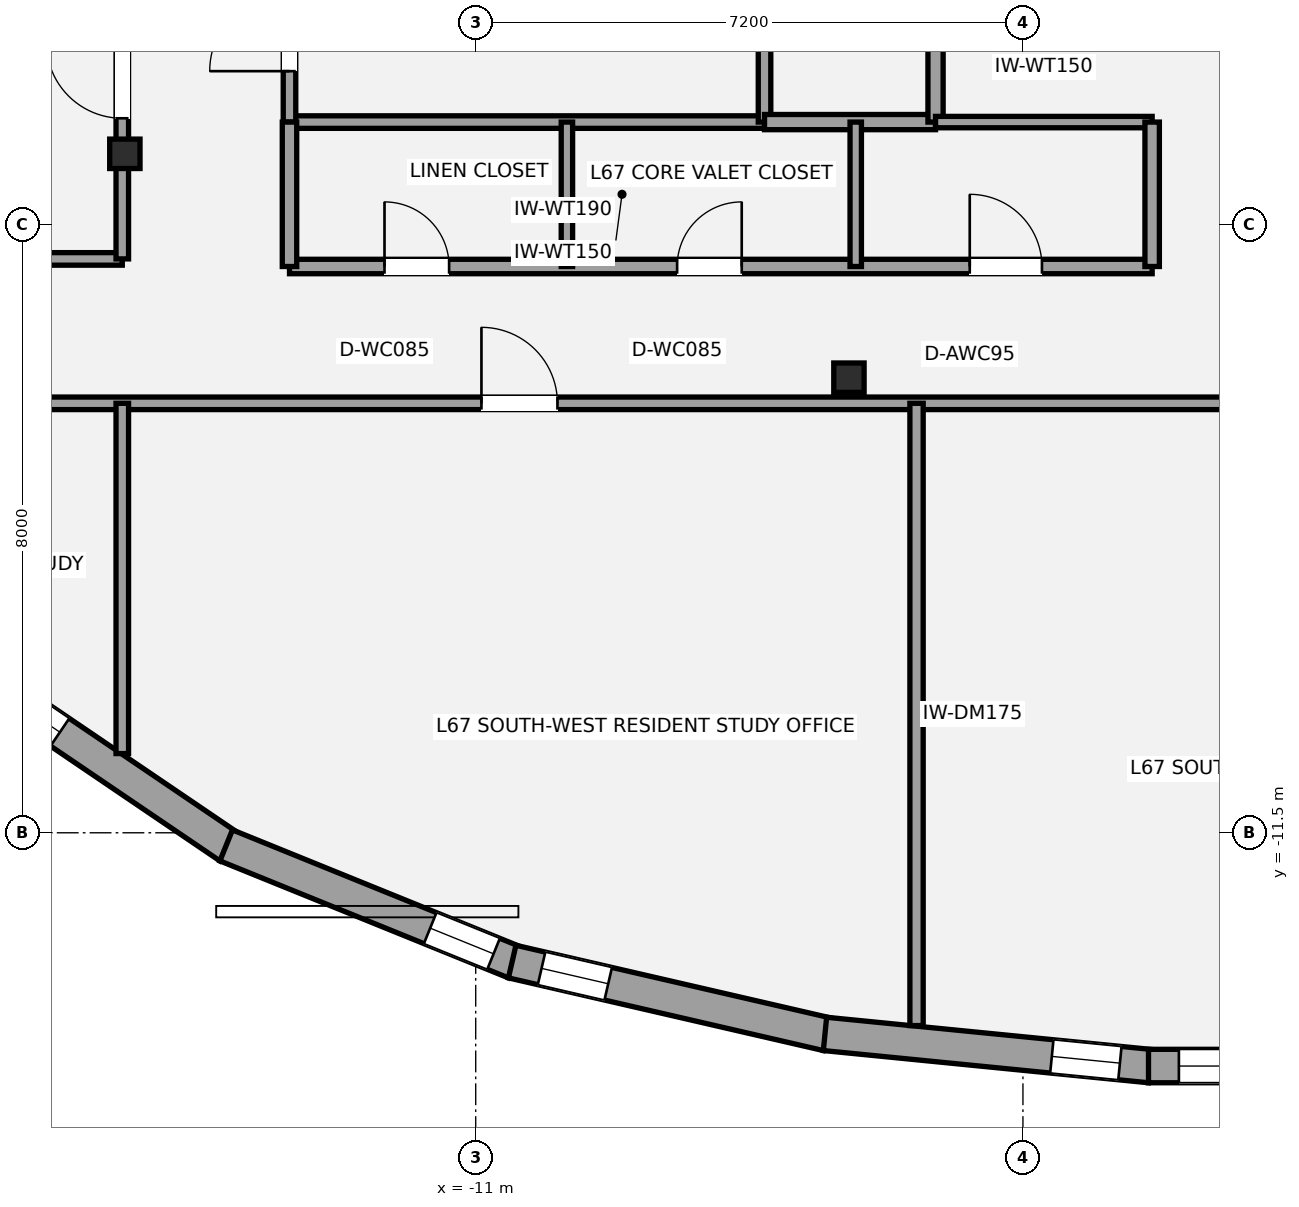
"""IFC4 building model, lengths in metres.
Left out: names, types, materials, properties, quantities, classifications, styles, units other than length and angle.
Written with IfcOpenShell. Run it as: python <this file> out.ifc"""

import sys

from ifc_helpers import new_model, si_unit, direction, frame, frame_2d, origin, origin_2d, place, context, subcontext, project, spatial, rectangle, i_section, extrude, element, fill, save


model = new_model("IFC4")
c1 = context("Model", 3, precision=1e-05, world=origin(), true_north=direction((0.0, 1.0)))
c2 = subcontext(c1, "Body", "Model", "MODEL_VIEW")
j1 = project(units=[si_unit("LENGTHUNIT", "METRE"), si_unit("PLANEANGLEUNIT", "RADIAN")], contexts=[c1])
p1 = place(None, origin())
s1 = spatial("IfcSite", under=j1, at=p1, CompositionType="ELEMENT")
p2 = place(p1, origin())
s2 = spatial("IfcBuilding", under=s1, at=p2, CompositionType="ELEMENT")
p3 = place(p2, frame((0.0, 0.0, 238.35)))
s3 = spatial("IfcBuildingStorey", under=s2, at=p3, CompositionType="ELEMENT", Elevation=238.35)
for number, where, z_axis, x_axis in (
    (1, (-15.616, -2.567, 0.0), (0.0, 0.0, 1.0), (1.0, 0.0, 0.0)),
    (2, (-6.09, -5.513, 0.0), (0.0, 0.0, 1.0), (1.0, 0.0, 0.0)),
):
    element("IfcColumn", number, at=place(p3, frame(where, z_axis=z_axis, x_axis=x_axis)), inside=s3, PredefinedType="COLUMN", context=c2, shape_type="SweptSolid", body=[
        extrude(i_section(OverallWidth=0.399, OverallDepth=0.387, WebThickness=0.021, FlangeThickness=0.033, at=origin_2d()), origin(), (0.0, 0.0, 1.0), 3.15),
    ])
p4 = place(p3, frame((-14.242, -11.688, 0.0), z_axis=(0.0, 0.0, 1.0), x_axis=(-0.827637036896, 0.561263694851, 0.0)))
e3 = element("IfcWall", 3, at=p4, inside=s3, PredefinedType="STANDARD", context=c2, shape_type="SweptSolid", body=[
    extrude(rectangle(XDim=3.793, YDim=0.44, at=frame_2d((1.896, 0.0))), origin(), (0.0, 0.0, 1.0), 2.336),
])
p5 = place(p4, frame((2.693, 0.0, 0.58)))
e4 = element("IfcOpeningElement", 4, at=p5, cuts=e3, PredefinedType="OPENING", context=c2, shape_type="SweptSolid", body=[
    extrude(rectangle(XDim=0.9, YDim=1.35, at=frame_2d((0.45, 0.675))), frame((0.0, 0.23, 0.0), z_axis=(0.0, -1.0, 0.0), x_axis=(1.0, 0.0, 0.0)), (0.0, 0.0, 1.0), 0.46),
])
p6 = place(p3, frame((-10.487, -13.205, 0.0), z_axis=(0.0, 0.0, 1.0), x_axis=(-0.926731976866, 0.375723093586, 0.0)))
e5 = element("IfcWall", 5, at=p6, inside=s3, PredefinedType="STANDARD", context=c2, shape_type="SweptSolid", body=[
    extrude(rectangle(XDim=4.096, YDim=0.44, at=frame_2d((2.048, 0.0))), origin(), (0.0, 0.0, 1.0), 2.336),
])
p7 = place(p6, frame((0.3, 0.0, 0.58)))
e6 = element("IfcOpeningElement", 6, at=p7, cuts=e5, PredefinedType="OPENING", context=c2, shape_type="SweptSolid", body=[
    extrude(rectangle(XDim=0.9, YDim=1.35, at=frame_2d((0.45, 0.675))), frame((0.0, 0.23, 0.0), z_axis=(0.0, -1.0, 0.0), x_axis=(1.0, 0.0, 0.0)), (0.0, 0.0, 1.0), 0.46),
])
p8 = place(p3, frame((-6.377, -14.151, 0.0), z_axis=(0.0, 0.0, 1.0), x_axis=(-0.974398936081, 0.224825962391, 0.0)))
e7 = element("IfcWall", 7, at=p8, inside=s3, PredefinedType="STANDARD", context=c2, shape_type="SweptSolid", body=[
    extrude(rectangle(XDim=4.252, YDim=0.44, at=frame_2d((2.126, 0.0))), origin(), (0.0, 0.0, 1.0), 2.336),
])
p9 = place(p8, frame((2.956, 0.0, 0.58)))
e8 = element("IfcOpeningElement", 8, at=p9, cuts=e7, PredefinedType="OPENING", context=c2, shape_type="SweptSolid", body=[
    extrude(rectangle(XDim=0.9, YDim=1.35, at=frame_2d((0.45, 0.675))), frame((0.0, 0.23, 0.0), z_axis=(0.0, -1.0, 0.0), x_axis=(1.0, 0.0, 0.0)), (0.0, 0.0, 1.0), 0.46),
])
p10 = place(p3, frame((-2.126, -14.57, 0.0), z_axis=(0.0, 0.0, 1.0), x_axis=(-0.995134540264, 0.098525361068, 0.0)))
e9 = element("IfcWall", 9, at=p10, inside=s3, PredefinedType="STANDARD", context=c2, shape_type="SweptSolid", body=[
    extrude(rectangle(XDim=4.299, YDim=0.44, at=frame_2d((2.15, 0.0))), origin(), (0.0, 0.0, 1.0), 2.336),
])
p11 = place(p10, frame((0.4, 0.0, 0.58)))
e10 = element("IfcOpeningElement", 10, at=p11, cuts=e9, PredefinedType="OPENING", context=c2, shape_type="SweptSolid", body=[
    extrude(rectangle(XDim=0.9, YDim=1.35, at=frame_2d((0.45, 0.675))), frame((0.0, 0.23, 0.0), z_axis=(0.0, -1.0, 0.0), x_axis=(1.0, 0.0, 0.0)), (0.0, 0.0, 1.0), 0.46),
])
p12 = place(p3, frame((2.148, -14.569, 0.0), z_axis=(0.0, 0.0, 1.0), x_axis=(-1.0, 0.0, 0.0)))
e11 = element("IfcWall", 11, at=p12, inside=s3, PredefinedType="STANDARD", context=c2, shape_type="SweptSolid", body=[
    extrude(rectangle(XDim=4.296, YDim=0.44, at=frame_2d((2.148, 0.0))), origin(), (0.0, 0.0, 1.0), 2.336),
])
p13 = place(p12, frame((2.996, 0.0, 0.58)))
e12 = element("IfcOpeningElement", 12, at=p13, cuts=e11, PredefinedType="OPENING", context=c2, shape_type="SweptSolid", body=[
    extrude(rectangle(XDim=0.9, YDim=1.35, at=frame_2d((0.45, 0.675))), frame((0.0, 0.23, 0.0), z_axis=(0.0, -1.0, 0.0), x_axis=(1.0, 0.0, 0.0)), (0.0, 0.0, 1.0), 0.46),
])
p14 = place(p3, frame((-13.45, -2.15, 0.0), z_axis=(0.0, 0.0, 1.0), x_axis=(1.0, 0.0, 0.0)))
e13 = element("IfcWall", 13, at=p14, inside=s3, PredefinedType="PARTITIONING", context=c2, shape_type="SweptSolid", body=[
    extrude(rectangle(XDim=6.25, YDim=0.165, at=frame_2d((3.125, 0.0))), origin(), (0.0, 0.0, 1.0), 2.423),
])
p15 = place(p3, frame((-13.45, -2.15, 0.0), z_axis=(0.0, 0.0, 1.0), x_axis=(0.0, 1.0, 0.0)))
e14 = element("IfcWall", 14, at=p15, inside=s3, PredefinedType="PARTITIONING", context=c2, shape_type="SweptSolid", body=[
    extrude(rectangle(XDim=3.5, YDim=0.165, at=frame_2d((1.75, 0.0))), origin(), (0.0, 0.0, 1.0), 2.423),
])
p16 = place(p15, frame((0.67, 0.0, 0.0)))
e15 = element("IfcOpeningElement", 15, at=p16, cuts=e14, PredefinedType="OPENING", context=c2, shape_type="SweptSolid", body=[
    extrude(rectangle(XDim=1.05, YDim=2.15, at=frame_2d((0.525, 1.075))), frame((0.0, 0.093, 0.0), z_axis=(0.0, -1.0, 0.0), x_axis=(1.0, 0.0, 0.0)), (0.0, 0.0, 1.0), 0.185),
])
p17 = place(p3, frame((-7.2, -2.15, 0.0), z_axis=(0.0, 0.0, 1.0), x_axis=(0.0, 1.0, 0.0)))
e16 = element("IfcWall", 16, at=p17, inside=s3, PredefinedType="PARTITIONING", context=c2, shape_type="SweptSolid", body=[
    extrude(rectangle(XDim=3.5, YDim=0.165, at=frame_2d((1.75, 0.0))), origin(), (0.0, 0.0, 1.0), 2.423),
])
p18 = place(p3, frame((-7.2, -2.15, 0.0), z_axis=(0.0, 0.0, 1.0), x_axis=(1.0, 0.0, 0.0)))
e17 = element("IfcWall", 17, at=p18, inside=s3, PredefinedType="SOLIDWALL", context=c2, shape_type="SweptSolid", body=[
    extrude(rectangle(XDim=2.25, YDim=0.2, at=frame_2d((1.125, 0.0))), origin(), (0.0, 0.0, 1.0), 2.97),
])
p19 = place(p3, frame((-4.95, -2.15, 0.0), z_axis=(0.0, 0.0, 1.0), x_axis=(0.0, 1.0, 0.0)))
e18 = element("IfcWall", 18, at=p19, inside=s3, PredefinedType="SOLIDWALL", context=c2, shape_type="SweptSolid", body=[
    extrude(rectangle(XDim=3.5, YDim=0.2, at=frame_2d((1.75, 0.0))), origin(), (0.0, 0.0, 1.0), 2.423),
])
p20 = place(p19, frame((0.95, 0.0, 0.0)))
e19 = element("IfcOpeningElement", 19, at=p20, cuts=e18, PredefinedType="OPENING", context=c2, shape_type="SweptSolid", body=[
    extrude(rectangle(XDim=0.75, YDim=2.1, at=frame_2d((0.375, 1.05))), frame((0.0, 0.11, 0.0), z_axis=(0.0, -1.0, 0.0), x_axis=(1.0, 0.0, 0.0)), (0.0, 0.0, 1.0), 0.22),
])
p21 = place(p3, frame((-13.45, -4.05, 0.0), z_axis=(0.0, 0.0, 1.0), x_axis=(1.0, 0.0, 0.0)))
e20 = element("IfcWall", 20, at=p21, inside=s3, PredefinedType="PLUMBINGWALL", context=c2, shape_type="SweptSolid", body=[
    extrude(rectangle(XDim=11.35, YDim=0.19, at=frame_2d((5.675, 0.0))), origin(), (0.0, 0.0, 1.0), 2.357),
])
p22 = place(p21, frame((1.25, 0.0, 0.0)))
e21 = element("IfcOpeningElement", 21, at=p22, cuts=e20, PredefinedType="OPENING", context=c2, shape_type="SweptSolid", body=[
    extrude(rectangle(XDim=0.85, YDim=2.1, at=frame_2d((0.425, 1.05))), frame((0.0, 0.105, 0.0), z_axis=(0.0, -1.0, 0.0), x_axis=(1.0, 0.0, 0.0)), (0.0, 0.0, 1.0), 0.21),
])
p23 = place(p21, frame((5.1, 0.0, 0.0)))
e22 = element("IfcOpeningElement", 22, at=p23, cuts=e20, PredefinedType="OPENING", context=c2, shape_type="SweptSolid", body=[
    extrude(rectangle(XDim=0.85, YDim=2.1, at=frame_2d((0.425, 1.05))), frame((0.0, 0.105, 0.0), z_axis=(0.0, -1.0, 0.0), x_axis=(1.0, 0.0, 0.0)), (0.0, 0.0, 1.0), 0.21),
])
p24 = place(p21, frame((8.95, 0.0, 0.0)))
e23 = element("IfcOpeningElement", 23, at=p24, cuts=e20, PredefinedType="OPENING", context=c2, shape_type="SweptSolid", body=[
    extrude(rectangle(XDim=0.95, YDim=2.15, at=frame_2d((0.475, 1.075))), frame((0.0, 0.105, 0.0), z_axis=(0.0, -1.0, 0.0), x_axis=(1.0, 0.0, 0.0)), (0.0, 0.0, 1.0), 0.21),
])
p25 = place(p3, frame((-4.95, -2.15, 0.0), z_axis=(0.0, 0.0, 1.0), x_axis=(1.0, 0.0, 0.0)))
e24 = element("IfcWall", 24, at=p25, inside=s3, PredefinedType="PLUMBINGWALL", context=c2, shape_type="SweptSolid", body=[
    extrude(rectangle(XDim=2.85, YDim=0.15, at=frame_2d((1.425, 0.0))), origin(), (0.0, 0.0, 1.0), 2.97),
])
for number, where, z_axis, x_axis in (
    (25, (-13.45, -4.05, 0.0), (0.0, 0.0, 1.0), (0.0, 1.0, 0.0)),
    (26, (-2.1, -4.05, 0.0), (0.0, 0.0, 1.0), (0.0, 1.0, 0.0)),
):
    element("IfcWall", number, at=place(p3, frame(where, z_axis=z_axis, x_axis=x_axis)), inside=s3, PredefinedType="PLUMBINGWALL", context=c2, shape_type="SweptSolid", body=[
        extrude(rectangle(XDim=1.9, YDim=0.19, at=frame_2d((0.95, 0.0))), origin(), (0.0, 0.0, 1.0), 2.423),
    ])
p26 = place(p3, frame((-9.8, -4.05, 0.0), z_axis=(0.0, 0.0, 1.0), x_axis=(0.0, 1.0, 0.0)))
e27 = element("IfcWall", 27, at=p26, inside=s3, PredefinedType="PLUMBINGWALL", context=c2, shape_type="SweptSolid", body=[
    extrude(rectangle(XDim=1.9, YDim=0.15, at=frame_2d((0.95, 0.0))), origin(), (0.0, 0.0, 1.0), 2.97),
])
p27 = place(p3, frame((-6.0, -4.05, 0.0), z_axis=(0.0, 0.0, 1.0), x_axis=(0.0, 1.0, 0.0)))
e28 = element("IfcWall", 28, at=p27, inside=s3, PredefinedType="PLUMBINGWALL", context=c2, shape_type="SweptSolid", body=[
    extrude(rectangle(XDim=1.9, YDim=0.15, at=frame_2d((0.95, 0.0))), origin(), (0.0, 0.0, 1.0), 2.431),
])
p28 = place(p3, frame((-19.935, -5.85, 0.0), z_axis=(0.0, 0.0, 1.0), x_axis=(1.0, 0.0, 0.0)))
e29 = element("IfcWall", 29, at=p28, inside=s3, PredefinedType="PARTITIONING", context=c2, shape_type="SweptSolid", body=[
    extrude(rectangle(XDim=39.869, YDim=0.165, at=frame_2d((19.935, 0.0))), origin(), (0.0, 0.0, 1.0), 2.423),
])
p29 = place(p28, frame((1.221, 0.0, 0.0)))
e30 = element("IfcOpeningElement", 30, at=p29, cuts=e29, PredefinedType="OPENING", context=c2, shape_type="SweptSolid", body=[
    extrude(rectangle(XDim=1.0, YDim=2.15, at=frame_2d((0.5, 1.075))), frame((0.0, 0.093, 0.0), z_axis=(0.0, -1.0, 0.0), x_axis=(1.0, 0.0, 0.0)), (0.0, 0.0, 1.0), 0.185),
])
p30 = place(p28, frame((37.748, 0.0, 0.0)))
e31 = element("IfcOpeningElement", 31, at=p30, cuts=e29, PredefinedType="OPENING", context=c2, shape_type="SweptSolid", body=[
    extrude(rectangle(XDim=1.0, YDim=2.15, at=frame_2d((0.5, 1.075))), frame((0.0, 0.093, 0.0), z_axis=(0.0, -1.0, 0.0), x_axis=(1.0, 0.0, 0.0)), (0.0, 0.0, 1.0), 0.185),
])
p31 = place(p28, frame((9.01, 0.0, 0.0)))
e32 = element("IfcOpeningElement", 32, at=p31, cuts=e29, PredefinedType="OPENING", context=c2, shape_type="SweptSolid", body=[
    extrude(rectangle(XDim=1.0, YDim=2.15, at=frame_2d((0.5, 1.075))), frame((0.0, 0.093, 0.0), z_axis=(0.0, -1.0, 0.0), x_axis=(1.0, 0.0, 0.0)), (0.0, 0.0, 1.0), 0.185),
])
p32 = place(p28, frame((19.435, 0.0, 0.0)))
e33 = element("IfcOpeningElement", 33, at=p32, cuts=e29, PredefinedType="OPENING", context=c2, shape_type="SweptSolid", body=[
    extrude(rectangle(XDim=1.0, YDim=2.15, at=frame_2d((0.5, 1.075))), frame((0.0, 0.093, 0.0), z_axis=(0.0, -1.0, 0.0), x_axis=(1.0, 0.0, 0.0)), (0.0, 0.0, 1.0), 0.185),
])
p33 = place(p28, frame((29.96, 0.0, 0.0)))
e34 = element("IfcOpeningElement", 34, at=p33, cuts=e29, PredefinedType="OPENING", context=c2, shape_type="SweptSolid", body=[
    extrude(rectangle(XDim=1.0, YDim=2.15, at=frame_2d((0.5, 1.075))), frame((0.0, 0.093, 0.0), z_axis=(0.0, -1.0, 0.0), x_axis=(1.0, 0.0, 0.0)), (0.0, 0.0, 1.0), 0.185),
])
p34 = place(p3, frame((-20.814, -3.95, 0.0), z_axis=(0.0, 0.0, 1.0), x_axis=(1.0, 0.0, 0.0)))
e35 = element("IfcWall", 35, at=p34, inside=s3, PredefinedType="PARTITIONING", context=c2, shape_type="SweptSolid", body=[
    extrude(rectangle(XDim=5.164, YDim=0.165, at=frame_2d((2.582, 0.0))), origin(), (0.0, 0.0, 1.0), 2.423),
])
p35 = place(p3, frame((-15.65, -3.95, 0.0), z_axis=(0.0, 0.0, 1.0), x_axis=(0.0, 1.0, 0.0)))
e36 = element("IfcWall", 36, at=p35, inside=s3, PredefinedType="PARTITIONING", context=c2, shape_type="SweptSolid", body=[
    extrude(rectangle(XDim=3.6, YDim=0.165, at=frame_2d((1.8, 0.0))), origin(), (0.0, 0.0, 1.0), 2.357),
])
p36 = place(p35, frame((1.85, 0.0, 0.0)))
e37 = element("IfcOpeningElement", 37, at=p36, cuts=e36, PredefinedType="OPENING", context=c2, shape_type="SweptSolid", body=[
    extrude(rectangle(XDim=1.0, YDim=2.15, at=frame_2d((0.5, 1.075))), frame((0.0, 0.093, 0.0), z_axis=(0.0, -1.0, 0.0), x_axis=(1.0, 0.0, 0.0)), (0.0, 0.0, 1.0), 0.185),
])
p37 = place(p3, frame((-15.65, -10.458, 0.0), z_axis=(0.0, 0.0, 1.0), x_axis=(0.0, 1.0, 0.0)))
e38 = element("IfcWall", 38, at=p37, inside=s3, PredefinedType="PARTITIONING", context=c2, shape_type="SweptSolid", body=[
    extrude(rectangle(XDim=4.608, YDim=0.165, at=frame_2d((2.304, 0.0))), origin(), (0.0, 0.0, 1.0), 2.423),
])
p38 = place(p3, frame((-5.2, -14.036, 0.0), z_axis=(0.0, 0.0, 1.0), x_axis=(0.0, 1.0, 0.0)))
e39 = element("IfcWall", 39, at=p38, inside=s3, PredefinedType="PARTITIONING", context=c2, shape_type="SweptSolid", body=[
    extrude(rectangle(XDim=8.186, YDim=0.175, at=frame_2d((4.093, 0.0))), origin(), (0.0, 0.0, 1.0), 2.423),
])
p39 = place(p5, origin())
e40 = element("IfcWindow", 40, at=p39, inside=s3, PartitioningType="SINGLE_PANEL", PredefinedType="WINDOW", context=c2, shape_type="SweptSolid", body=[
    extrude(rectangle(XDim=0.9, YDim=1.35, at=frame_2d((0.45, 0.675))), frame((0.0, -0.01, 0.0), z_axis=(0.0, -1.0, 0.0), x_axis=(1.0, 0.0, 0.0)), (0.0, 0.0, 1.0), 0.06),
])
fill(e4, e40)
p40 = place(p7, origin())
e41 = element("IfcWindow", 41, at=p40, inside=s3, PartitioningType="SINGLE_PANEL", PredefinedType="WINDOW", context=c2, shape_type="SweptSolid", body=[
    extrude(rectangle(XDim=0.9, YDim=1.35, at=frame_2d((0.45, 0.675))), frame((0.0, -0.01, 0.0), z_axis=(0.0, -1.0, 0.0), x_axis=(1.0, 0.0, 0.0)), (0.0, 0.0, 1.0), 0.06),
])
fill(e6, e41)
p41 = place(p9, origin())
e42 = element("IfcWindow", 42, at=p41, inside=s3, PartitioningType="SINGLE_PANEL", PredefinedType="WINDOW", context=c2, shape_type="SweptSolid", body=[
    extrude(rectangle(XDim=0.9, YDim=1.35, at=frame_2d((0.45, 0.675))), frame((0.0, -0.01, 0.0), z_axis=(0.0, -1.0, 0.0), x_axis=(1.0, 0.0, 0.0)), (0.0, 0.0, 1.0), 0.06),
])
fill(e8, e42)
p42 = place(p11, origin())
e43 = element("IfcWindow", 43, at=p42, inside=s3, PartitioningType="SINGLE_PANEL", PredefinedType="WINDOW", context=c2, shape_type="SweptSolid", body=[
    extrude(rectangle(XDim=0.9, YDim=1.35, at=frame_2d((0.45, 0.675))), frame((0.0, -0.01, 0.0), z_axis=(0.0, -1.0, 0.0), x_axis=(1.0, 0.0, 0.0)), (0.0, 0.0, 1.0), 0.06),
])
fill(e10, e43)
p43 = place(p13, origin())
e44 = element("IfcWindow", 44, at=p43, inside=s3, PartitioningType="SINGLE_PANEL", PredefinedType="WINDOW", context=c2, shape_type="SweptSolid", body=[
    extrude(rectangle(XDim=0.9, YDim=1.35, at=frame_2d((0.45, 0.675))), frame((0.0, -0.01, 0.0), z_axis=(0.0, -1.0, 0.0), x_axis=(1.0, 0.0, 0.0)), (0.0, 0.0, 1.0), 0.06),
])
fill(e12, e44)
p44 = place(p16, origin())
e45 = element("IfcDoor", 45, at=p44, inside=s3, OperationType="SINGLE_SWING_LEFT", PredefinedType="DOOR", context=c2, shape_type="SweptSolid", body=[
    extrude(rectangle(XDim=1.05, YDim=2.15, at=frame_2d((0.525, 1.075))), frame((0.0, 0.025, 0.0), z_axis=(0.0, -1.0, 0.0), x_axis=(1.0, 0.0, 0.0)), (0.0, 0.0, 1.0), 0.05),
])
fill(e15, e45)
p45 = place(p22, origin())
e46 = element("IfcDoor", 46, at=p45, inside=s3, OperationType="SINGLE_SWING_LEFT", PredefinedType="DOOR", context=c2, shape_type="SweptSolid", body=[
    extrude(rectangle(XDim=0.85, YDim=2.1, at=frame_2d((0.425, 1.05))), frame((0.0, 0.025, 0.0), z_axis=(0.0, -1.0, 0.0), x_axis=(1.0, 0.0, 0.0)), (0.0, 0.0, 1.0), 0.05),
])
fill(e21, e46)
p46 = place(p23, origin())
e47 = element("IfcDoor", 47, at=p46, inside=s3, OperationType="SINGLE_SWING_RIGHT", PredefinedType="DOOR", context=c2, shape_type="SweptSolid", body=[
    extrude(rectangle(XDim=0.85, YDim=2.1, at=frame_2d((0.425, 1.05))), frame((0.0, 0.025, 0.0), z_axis=(0.0, -1.0, 0.0), x_axis=(1.0, 0.0, 0.0)), (0.0, 0.0, 1.0), 0.05),
])
fill(e22, e47)
p47 = place(p24, origin())
e48 = element("IfcDoor", 48, at=p47, inside=s3, OperationType="SINGLE_SWING_LEFT", PredefinedType="DOOR", context=c2, shape_type="SweptSolid", body=[
    extrude(rectangle(XDim=0.95, YDim=2.15, at=frame_2d((0.475, 1.075))), frame((0.0, 0.025, 0.0), z_axis=(0.0, -1.0, 0.0), x_axis=(1.0, 0.0, 0.0)), (0.0, 0.0, 1.0), 0.05),
])
fill(e23, e48)
p48 = place(p31, origin())
e49 = element("IfcDoor", 49, at=p48, inside=s3, OperationType="SINGLE_SWING_LEFT", PredefinedType="DOOR", context=c2, shape_type="SweptSolid", body=[
    extrude(rectangle(XDim=1.0, YDim=2.15, at=frame_2d((0.5, 1.075))), frame((0.0, 0.025, 0.0), z_axis=(0.0, -1.0, 0.0), x_axis=(1.0, 0.0, 0.0)), (0.0, 0.0, 1.0), 0.05),
])
fill(e32, e49)
p49 = place(p36, origin())
e50 = element("IfcDoor", 50, at=p49, inside=s3, OperationType="SINGLE_SWING_RIGHT", PredefinedType="DOOR", context=c2, shape_type="SweptSolid", body=[
    extrude(rectangle(XDim=1.0, YDim=2.15, at=frame_2d((0.5, 1.075))), frame((0.0, 0.025, 0.0), z_axis=(0.0, -1.0, 0.0), x_axis=(1.0, 0.0, 0.0)), (0.0, 0.0, 1.0), 0.05),
])
fill(e37, e50)
save(model, sys.argv[1])
